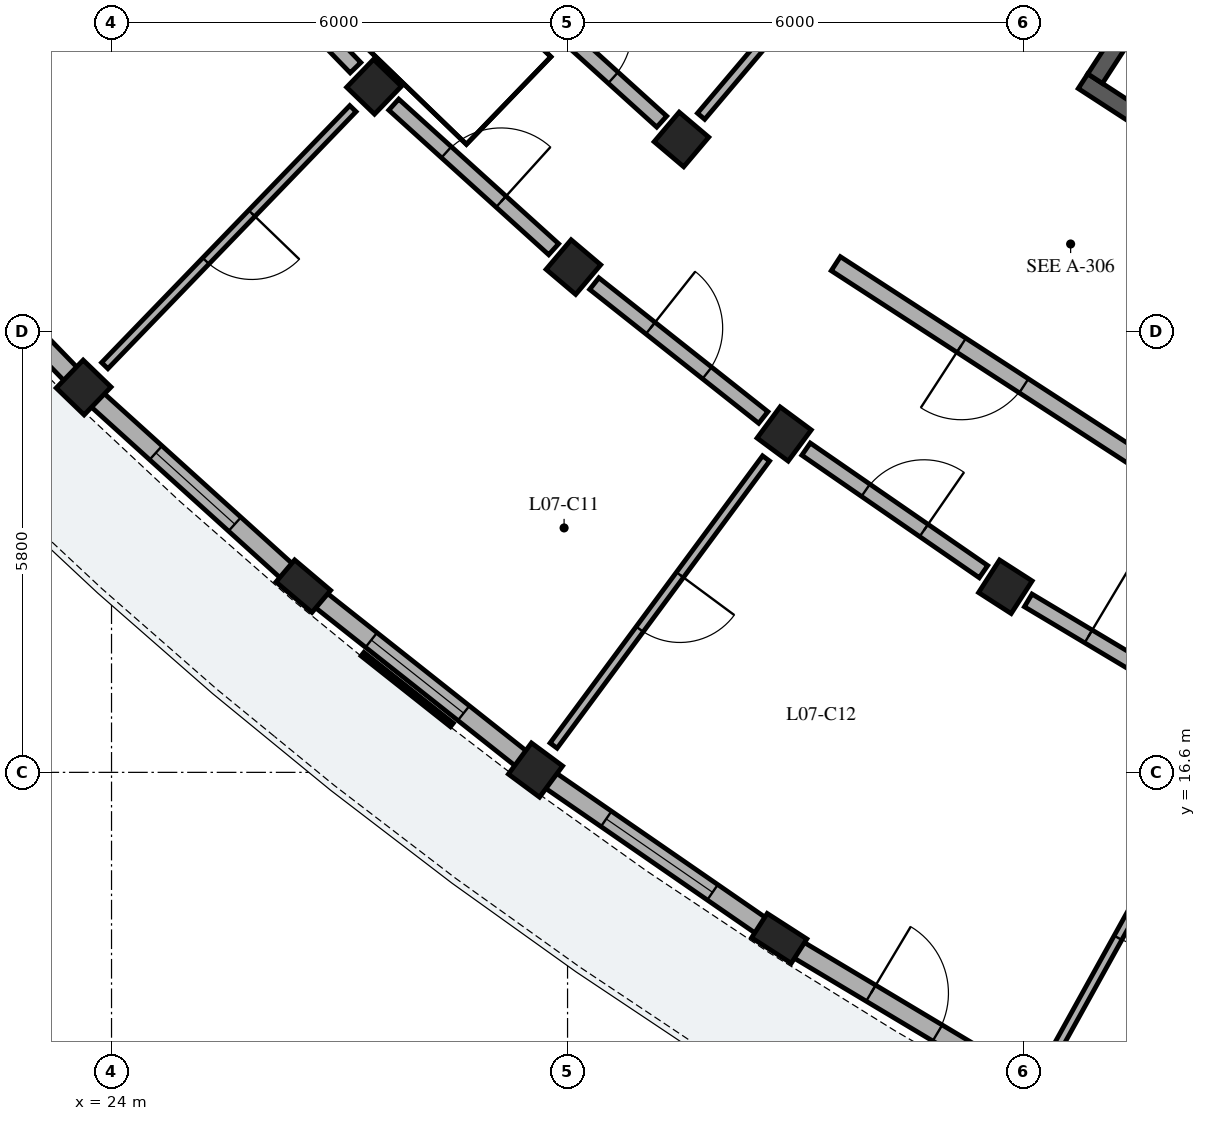
"""IFC4 building model, lengths in metres.
Left out: names, types, materials, properties, quantities, classifications, styles, units other than length and angle.
Written with IfcOpenShell. Run it as: python <this file> out.ifc"""

import sys

from ifc_helpers import new_model, si_unit, direction, frame, frame_2d, origin, origin_2d, place, context, subcontext, project, spatial, rectangle, extrude, element, fill, save


model = new_model("IFC4")
c1 = context("Model", 3, precision=1e-05, world=origin(), true_north=direction((0.0, 1.0)))
c2 = subcontext(c1, "Body", "Model", "MODEL_VIEW")
j1 = project(units=[si_unit("LENGTHUNIT", "METRE"), si_unit("PLANEANGLEUNIT", "RADIAN")], contexts=[c1])
p1 = place(None, origin())
s1 = spatial("IfcSite", under=j1, at=p1, CompositionType="ELEMENT")
p2 = place(p1, origin())
s2 = spatial("IfcBuilding", under=s1, at=p2, CompositionType="ELEMENT")
p3 = place(p2, frame((0.0, 0.0, 25.64)))
s3 = spatial("IfcBuildingStorey", under=s2, at=p3, CompositionType="ELEMENT", Elevation=25.64)
p4 = place(p3, frame((39.516, 23.917, 0.0), z_axis=(0.0, 0.0, 1.0), x_axis=(-0.838660840752, 0.544654013286, 0.0)))
e1 = element("IfcWall", 1, at=p4, inside=s3, PredefinedType="SHEAR", context=c2, shape_type="SweptSolid", body=[
    extrude(rectangle(XDim=3.26, YDim=0.23, at=frame_2d((1.63, 0.0))), origin(), (0.0, 0.0, 1.0), 3.11),
])
p5 = place(p4, frame((0.9, 0.0, 0.0)))
e2 = element("IfcOpeningElement", 2, at=p5, cuts=e1, PredefinedType="OPENING", context=c2, shape_type="SweptSolid", body=[
    extrude(rectangle(XDim=1.0, YDim=2.15, at=frame_2d((0.5, 1.075))), frame((0.0, 0.125, 0.0), z_axis=(0.0, -1.0, 0.0), x_axis=(1.0, 0.0, 0.0)), (0.0, 0.0, 1.0), 0.25),
])
p6 = place(p3, frame((36.941, 25.727, 0.0), z_axis=(0.0, 0.0, 1.0), x_axis=(0.544622789439, 0.838681117722, 0.0)))
e3 = element("IfcWall", 3, at=p6, inside=s3, PredefinedType="SHEAR", context=c2, shape_type="SweptSolid", body=[
    extrude(rectangle(XDim=2.7, YDim=0.23, at=frame_2d((1.35, 0.0))), origin(), (0.0, 0.0, 1.0), 3.11),
])
for number, where, z_axis, x_axis in (
    (4, (27.454, 25.62, 0.0), (0.0, 0.0, 1.0), (-0.695, -0.719, 0.0)),
    (5, (23.633, 21.663, 0.0), (0.0, 0.0, 1.0), (-0.695, -0.719, 0.0)),
    (6, (31.499, 24.927, 0.0), (0.0, 0.0, 1.0), (-0.646, -0.763, 0.0)),
    (7, (30.077, 23.247, 0.0), (0.0, 0.0, 1.0), (-0.646, -0.763, 0.0)),
):
    element("IfcColumn", number, at=place(p3, frame(where, z_axis=z_axis, x_axis=x_axis)), inside=s3, PredefinedType="COLUMN", context=c2, shape_type="SweptSolid", body=[
        extrude(rectangle(XDim=0.51, YDim=0.51, at=origin_2d()), origin(), (0.0, 0.0, 1.0), 3.11),
    ])
p7 = place(p3, frame((26.523, 19.05, 0.0), z_axis=(0.0, 0.0, 1.0), x_axis=(-0.646123979643, -0.763232469783, 0.0)))
e8 = element("IfcColumn", 8, at=p7, inside=s3, PredefinedType="PILASTER", context=c2, shape_type="SweptSolid", body=[
    extrude(rectangle(XDim=0.38, YDim=0.62, at=origin_2d()), origin(), (0.0, 0.0, 1.0), 3.11),
])
for number, where, z_axis, x_axis in (
    (9, (32.85, 21.052, 0.0), (0.0, 0.0, 1.0), (-0.595, -0.804, 0.0)),
    (10, (29.578, 16.63, 0.0), (0.0, 0.0, 1.0), (-0.595, -0.804, 0.0)),
    (11, (35.76, 19.042, 0.0), (0.0, 0.0, 1.0), (-0.541, -0.841, 0.0)),
):
    element("IfcColumn", number, at=place(p3, frame(where, z_axis=z_axis, x_axis=x_axis)), inside=s3, PredefinedType="COLUMN", context=c2, shape_type="SweptSolid", body=[
        extrude(rectangle(XDim=0.51, YDim=0.51, at=origin_2d()), origin(), (0.0, 0.0, 1.0), 3.11),
    ])
p8 = place(p3, frame((32.785, 14.416, 0.0), z_axis=(0.0, 0.0, 1.0), x_axis=(-0.540974471368, -0.841039012964, 0.0)))
e12 = element("IfcColumn", 12, at=p8, inside=s3, PredefinedType="PILASTER", context=c2, shape_type="SweptSolid", body=[
    extrude(rectangle(XDim=0.38, YDim=0.62, at=origin_2d()), origin(), (0.0, 0.0, 1.0), 3.11),
])
p9 = place(p3, frame((21.031, 24.346, 0.0), z_axis=(0.0, 0.0, 1.0), x_axis=(0.696213152496, -0.717835110797, 0.0)))
e13 = element("IfcWall", 13, at=p9, inside=s3, PredefinedType="SOLIDWALL", context=c2, shape_type="SweptSolid", body=[
    extrude(rectangle(XDim=3.512, YDim=0.245, at=frame_2d((1.756, 0.0))), origin(), (0.0, 0.0, 1.0), 2.355),
])
p10 = place(p9, frame((1.246, 0.0, 0.0)))
e14 = element("IfcOpeningElement", 14, at=p10, cuts=e13, PredefinedType="OPENING", context=c2, shape_type="SweptSolid", body=[
    extrude(rectangle(XDim=1.02, YDim=2.14, at=frame_2d((0.51, 1.07))), frame((0.0, 0.133, 0.0), z_axis=(0.0, -1.0, 0.0), x_axis=(1.0, 0.0, 0.0)), (0.0, 0.0, 1.0), 0.265),
])
p11 = place(p3, frame((23.8, 21.512, 0.0), z_axis=(0.0, 0.0, 1.0), x_axis=(0.74163953018, -0.670798633924, 0.0)))
e15 = element("IfcWall", 15, at=p11, inside=s3, PredefinedType="SOLIDWALL", context=c2, shape_type="SweptSolid", body=[
    extrude(rectangle(XDim=3.512, YDim=0.245, at=frame_2d((1.756, 0.0))), origin(), (0.0, 0.0, 1.0), 2.355),
])
p12 = place(p11, frame((1.056, 0.0, 0.35)))
e16 = element("IfcOpeningElement", 16, at=p12, cuts=e15, PredefinedType="OPENING", context=c2, shape_type="SweptSolid", body=[
    extrude(rectangle(XDim=1.4, YDim=1.65, at=frame_2d((0.7, 0.825))), frame((0.0, 0.133, 0.0), z_axis=(0.0, -1.0, 0.0), x_axis=(1.0, 0.0, 0.0)), (0.0, 0.0, 1.0), 0.265),
])
p13 = place(p3, frame((26.649, 18.95, 0.0), z_axis=(0.0, 0.0, 1.0), x_axis=(0.78396546672, -0.620804435383, 0.0)))
e17 = element("IfcWall", 17, at=p13, inside=s3, PredefinedType="SOLIDWALL", context=c2, shape_type="SweptSolid", body=[
    extrude(rectangle(XDim=3.512, YDim=0.245, at=frame_2d((1.756, 0.0))), origin(), (0.0, 0.0, 1.0), 2.355),
])
p14 = place(p13, frame((0.981, 0.0, 0.35)))
e18 = element("IfcOpeningElement", 18, at=p14, cuts=e17, PredefinedType="OPENING", context=c2, shape_type="SweptSolid", body=[
    extrude(rectangle(XDim=1.55, YDim=1.75, at=frame_2d((0.775, 0.875))), frame((0.0, 0.133, 0.0), z_axis=(0.0, -1.0, 0.0), x_axis=(1.0, 0.0, 0.0)), (0.0, 0.0, 1.0), 0.265),
])
p15 = place(p3, frame((29.763, 16.502, 0.0), z_axis=(0.0, 0.0, 1.0), x_axis=(0.822902318015, -0.568182871094, 0.0)))
e19 = element("IfcWall", 19, at=p15, inside=s3, PredefinedType="SOLIDWALL", context=c2, shape_type="SweptSolid", body=[
    extrude(rectangle(XDim=3.512, YDim=0.245, at=frame_2d((1.756, 0.0))), origin(), (0.0, 0.0, 1.0), 2.355),
])
p16 = place(p15, frame((0.906, 0.0, 0.35)))
e20 = element("IfcOpeningElement", 20, at=p16, cuts=e19, PredefinedType="OPENING", context=c2, shape_type="SweptSolid", body=[
    extrude(rectangle(XDim=1.7, YDim=1.8, at=frame_2d((0.85, 0.9))), frame((0.0, 0.133, 0.0), z_axis=(0.0, -1.0, 0.0), x_axis=(1.0, 0.0, 0.0)), (0.0, 0.0, 1.0), 0.265),
])
p17 = place(p3, frame((32.922, 14.334, 0.0), z_axis=(0.0, 0.0, 1.0), x_axis=(0.858277078874, -0.513186570245, 0.0)))
e21 = element("IfcWall", 21, at=p17, inside=s3, PredefinedType="SOLIDWALL", context=c2, shape_type="SweptSolid", body=[
    extrude(rectangle(XDim=3.512, YDim=0.245, at=frame_2d((1.756, 0.0))), origin(), (0.0, 0.0, 1.0), 2.355),
])
p18 = place(p17, frame((1.246, 0.0, 0.0)))
e22 = element("IfcOpeningElement", 22, at=p18, cuts=e21, PredefinedType="OPENING", context=c2, shape_type="SweptSolid", body=[
    extrude(rectangle(XDim=1.02, YDim=2.14, at=frame_2d((0.51, 1.07))), frame((0.0, 0.133, 0.0), z_axis=(0.0, -1.0, 0.0), x_axis=(1.0, 0.0, 0.0)), (0.0, 0.0, 1.0), 0.265),
])
p19 = place(p3, frame((37.639, 20.623, 0.0), z_axis=(0.0, 0.0, 1.0), x_axis=(-0.838681446513, 0.544622283124, 0.0)))
e23 = element("IfcWall", 23, at=p19, inside=s3, PredefinedType="PARTITIONING", context=c2, shape_type="SweptSolid", body=[
    extrude(rectangle(XDim=4.9, YDim=0.22, at=frame_2d((2.45, 0.0))), origin(), (0.0, 0.0, 1.0), 2.34),
])
p20 = place(p19, frame((1.95, 0.0, 0.0)))
e24 = element("IfcOpeningElement", 24, at=p20, cuts=e23, PredefinedType="OPENING", context=c2, shape_type="SweptSolid", body=[
    extrude(rectangle(XDim=0.98, YDim=2.14, at=frame_2d((0.49, 1.07))), frame((0.0, 0.12, 0.0), z_axis=(0.0, -1.0, 0.0), x_axis=(1.0, 0.0, 0.0)), (0.0, 0.0, 1.0), 0.24),
])
p21 = place(p3, frame((25.235, 27.907, 0.0), z_axis=(0.0, 0.0, 1.0), x_axis=(0.696223786753, -0.717824796701, 0.0)))
e25 = element("IfcWall", 25, at=p21, inside=s3, PredefinedType="PARTITIONING", context=c2, shape_type="SweptSolid", body=[
    extrude(rectangle(XDim=2.837, YDim=0.195, at=frame_2d((1.418, 0.0))), origin(), (0.0, 0.0, 1.0), 2.37),
])
p22 = place(p21, frame((0.924, 0.0, 0.0)))
e26 = element("IfcOpeningElement", 26, at=p22, cuts=e25, PredefinedType="OPENING", context=c2, shape_type="SweptSolid", body=[
    extrude(rectangle(XDim=0.99, YDim=2.16, at=frame_2d((0.495, 1.08))), frame((0.0, 0.107, 0.0), z_axis=(0.0, -1.0, 0.0), x_axis=(1.0, 0.0, 0.0)), (0.0, 0.0, 1.0), 0.215),
])
p23 = place(p3, frame((27.176, 25.332, 0.0), z_axis=(0.0, 0.0, 1.0), x_axis=(-0.69466218314, -0.719336118456, 0.0)))
e27 = element("IfcWall", 27, at=p23, inside=s3, PredefinedType="PARTITIONING", context=c2, shape_type="SweptSolid", body=[
    extrude(rectangle(XDim=4.7, YDim=0.115, at=frame_2d((2.35, 0.0))), origin(), (0.0, 0.0, 1.0), 2.37),
])
p24 = place(p23, frame((1.915, 0.0, 0.0)))
e28 = element("IfcOpeningElement", 28, at=p24, cuts=e27, PredefinedType="OPENING", context=c2, shape_type="SweptSolid", body=[
    extrude(rectangle(XDim=0.87, YDim=2.08, at=frame_2d((0.435, 1.04))), frame((0.0, 0.067, 0.0), z_axis=(0.0, -1.0, 0.0), x_axis=(1.0, 0.0, 0.0)), (0.0, 0.0, 1.0), 0.135),
])
p25 = place(p3, frame((27.713, 25.385, 0.0), z_axis=(0.0, 0.0, 1.0), x_axis=(0.741631592147, -0.670807410163, 0.0)))
e29 = element("IfcWall", 29, at=p25, inside=s3, PredefinedType="PARTITIONING", context=c2, shape_type="SweptSolid", body=[
    extrude(rectangle(XDim=2.837, YDim=0.195, at=frame_2d((1.418, 0.0))), origin(), (0.0, 0.0, 1.0), 2.37),
])
p26 = place(p25, frame((0.934, 0.0, 0.0)))
e30 = element("IfcOpeningElement", 30, at=p26, cuts=e29, PredefinedType="OPENING", context=c2, shape_type="SweptSolid", body=[
    extrude(rectangle(XDim=0.97, YDim=2.15, at=frame_2d((0.485, 1.075))), frame((0.0, 0.107, 0.0), z_axis=(0.0, -1.0, 0.0), x_axis=(1.0, 0.0, 0.0)), (0.0, 0.0, 1.0), 0.215),
])
p27 = place(p3, frame((29.241, 26.968, 0.0), z_axis=(0.0, 0.0, 1.0), x_axis=(0.74166462946, -0.670770882945, 0.0)))
e31 = element("IfcWall", 31, at=p27, inside=s3, PredefinedType="PARTITIONING", context=c2, shape_type="SweptSolid", body=[
    extrude(rectangle(XDim=2.693, YDim=0.195, at=frame_2d((1.347, 0.0))), origin(), (0.0, 0.0, 1.0), 2.37),
])
p28 = place(p27, frame((0.862, 0.0, 0.0)))
e32 = element("IfcOpeningElement", 32, at=p28, cuts=e31, PredefinedType="OPENING", context=c2, shape_type="SweptSolid", body=[
    extrude(rectangle(XDim=0.97, YDim=2.15, at=frame_2d((0.485, 1.075))), frame((0.0, 0.107, 0.0), z_axis=(0.0, -1.0, 0.0), x_axis=(1.0, 0.0, 0.0)), (0.0, 0.0, 1.0), 0.215),
])
p29 = place(p3, frame((36.021, 30.269, 0.0), z_axis=(0.0, 0.0, 1.0), x_axis=(-0.646121311019, -0.763234728932, 0.0)))
e33 = element("IfcWall", 33, at=p29, inside=s3, PredefinedType="PARTITIONING", context=c2, shape_type="SweptSolid", body=[
    extrude(rectangle(XDim=6.6, YDim=0.125, at=frame_2d((3.3, 0.0))), origin(), (0.0, 0.0, 1.0), 2.37),
])
p30 = place(p29, frame((2.855, 0.0, 0.0)))
e34 = element("IfcOpeningElement", 34, at=p30, cuts=e33, PredefinedType="OPENING", context=c2, shape_type="SweptSolid", body=[
    extrude(rectangle(XDim=0.89, YDim=2.1, at=frame_2d((0.445, 1.05))), frame((0.0, 0.073, 0.0), z_axis=(0.0, -1.0, 0.0), x_axis=(1.0, 0.0, 0.0)), (0.0, 0.0, 1.0), 0.145),
])
p31 = place(p3, frame((30.351, 23.03, 0.0), z_axis=(0.0, 0.0, 1.0), x_axis=(0.783965548427, -0.620804332201, 0.0)))
e35 = element("IfcWall", 35, at=p31, inside=s3, PredefinedType="PARTITIONING", context=c2, shape_type="SweptSolid", body=[
    extrude(rectangle(XDim=2.837, YDim=0.195, at=frame_2d((1.418, 0.0))), origin(), (0.0, 0.0, 1.0), 2.37),
])
p32 = place(p31, frame((0.944, 0.0, 0.0)))
e36 = element("IfcOpeningElement", 36, at=p32, cuts=e35, PredefinedType="OPENING", context=c2, shape_type="SweptSolid", body=[
    extrude(rectangle(XDim=0.95, YDim=2.13, at=frame_2d((0.475, 1.065))), frame((0.0, 0.107, 0.0), z_axis=(0.0, -1.0, 0.0), x_axis=(1.0, 0.0, 0.0)), (0.0, 0.0, 1.0), 0.215),
])
p33 = place(p3, frame((32.612, 20.73, 0.0), z_axis=(0.0, 0.0, 1.0), x_axis=(-0.59482622273, -0.803854318116, 0.0)))
e37 = element("IfcWall", 37, at=p33, inside=s3, PredefinedType="PARTITIONING", context=c2, shape_type="SweptSolid", body=[
    extrude(rectangle(XDim=4.7, YDim=0.115, at=frame_2d((2.35, 0.0))), origin(), (0.0, 0.0, 1.0), 2.37),
])
p34 = place(p33, frame((1.905, 0.0, 0.0)))
e38 = element("IfcOpeningElement", 38, at=p34, cuts=e37, PredefinedType="OPENING", context=c2, shape_type="SweptSolid", body=[
    extrude(rectangle(XDim=0.89, YDim=2.1, at=frame_2d((0.445, 1.05))), frame((0.0, 0.067, 0.0), z_axis=(0.0, -1.0, 0.0), x_axis=(1.0, 0.0, 0.0)), (0.0, 0.0, 1.0), 0.135),
])
p35 = place(p3, frame((33.138, 20.853, 0.0), z_axis=(0.0, 0.0, 1.0), x_axis=(0.822870075235, -0.568229565653, 0.0)))
e39 = element("IfcWall", 39, at=p35, inside=s3, PredefinedType="PARTITIONING", context=c2, shape_type="SweptSolid", body=[
    extrude(rectangle(XDim=2.837, YDim=0.195, at=frame_2d((1.418, 0.0))), origin(), (0.0, 0.0, 1.0), 2.37),
])
p36 = place(p35, frame((0.954, 0.0, 0.0)))
e40 = element("IfcOpeningElement", 40, at=p36, cuts=e39, PredefinedType="OPENING", context=c2, shape_type="SweptSolid", body=[
    extrude(rectangle(XDim=0.93, YDim=2.12, at=frame_2d((0.465, 1.06))), frame((0.0, 0.107, 0.0), z_axis=(0.0, -1.0, 0.0), x_axis=(1.0, 0.0, 0.0)), (0.0, 0.0, 1.0), 0.215),
])
p37 = place(p3, frame((36.061, 18.862, 0.0), z_axis=(0.0, 0.0, 1.0), x_axis=(0.858281647443, -0.51317892948, 0.0)))
e41 = element("IfcWall", 41, at=p37, inside=s3, PredefinedType="PARTITIONING", context=c2, shape_type="SweptSolid", body=[
    extrude(rectangle(XDim=2.837, YDim=0.195, at=frame_2d((1.418, 0.0))), origin(), (0.0, 0.0, 1.0), 2.37),
])
p38 = place(p37, frame((0.924, 0.0, 0.0)))
e42 = element("IfcOpeningElement", 42, at=p38, cuts=e41, PredefinedType="OPENING", context=c2, shape_type="SweptSolid", body=[
    extrude(rectangle(XDim=0.99, YDim=2.16, at=frame_2d((0.495, 1.08))), frame((0.0, 0.107, 0.0), z_axis=(0.0, -1.0, 0.0), x_axis=(1.0, 0.0, 0.0)), (0.0, 0.0, 1.0), 0.215),
])
p39 = place(p3, frame((38.602, 16.877, 0.0), z_axis=(0.0, 0.0, 1.0), x_axis=(-0.484813534336, -0.874617537513, 0.0)))
e43 = element("IfcWall", 43, at=p39, inside=s3, PredefinedType="PARTITIONING", context=c2, shape_type="SweptSolid", body=[
    extrude(rectangle(XDim=4.7, YDim=0.115, at=frame_2d((2.35, 0.0))), origin(), (0.0, 0.0, 1.0), 2.37),
])
p40 = place(p39, frame((1.895, 0.0, 0.0)))
e44 = element("IfcOpeningElement", 44, at=p40, cuts=e43, PredefinedType="OPENING", context=c2, shape_type="SweptSolid", body=[
    extrude(rectangle(XDim=0.91, YDim=2.1, at=frame_2d((0.455, 1.05))), frame((0.0, 0.067, 0.0), z_axis=(0.0, -1.0, 0.0), x_axis=(1.0, 0.0, 0.0)), (0.0, 0.0, 1.0), 0.135),
])
p41 = place(p12, origin())
e45 = element("IfcWindow", 45, at=p41, inside=s3, PartitioningType="SINGLE_PANEL", PredefinedType="WINDOW", context=c2, shape_type="SweptSolid", body=[
    extrude(rectangle(XDim=1.4, YDim=1.65, at=frame_2d((0.7, 0.825))), frame((0.0, 0.03, 0.0), z_axis=(0.0, -1.0, 0.0), x_axis=(1.0, 0.0, 0.0)), (0.0, 0.0, 1.0), 0.06),
])
fill(e16, e45)
p42 = place(p14, origin())
e46 = element("IfcWindow", 46, at=p42, inside=s3, PartitioningType="SINGLE_PANEL", PredefinedType="WINDOW", context=c2, shape_type="SweptSolid", body=[
    extrude(rectangle(XDim=1.55, YDim=1.75, at=frame_2d((0.775, 0.875))), frame((0.0, 0.03, 0.0), z_axis=(0.0, -1.0, 0.0), x_axis=(1.0, 0.0, 0.0)), (0.0, 0.0, 1.0), 0.06),
])
fill(e18, e46)
p43 = place(p16, origin())
e47 = element("IfcWindow", 47, at=p43, inside=s3, PartitioningType="SINGLE_PANEL", PredefinedType="WINDOW", context=c2, shape_type="SweptSolid", body=[
    extrude(rectangle(XDim=1.7, YDim=1.8, at=frame_2d((0.85, 0.9))), frame((0.0, 0.03, 0.0), z_axis=(0.0, -1.0, 0.0), x_axis=(1.0, 0.0, 0.0)), (0.0, 0.0, 1.0), 0.06),
])
fill(e20, e47)
p44 = place(p18, origin())
e48 = element("IfcDoor", 48, at=p44, inside=s3, OperationType="SINGLE_SWING_LEFT", PredefinedType="DOOR", context=c2, shape_type="SweptSolid", body=[
    extrude(rectangle(XDim=1.02, YDim=2.14, at=frame_2d((0.51, 1.07))), frame((0.0, 0.025, 0.0), z_axis=(0.0, -1.0, 0.0), x_axis=(1.0, 0.0, 0.0)), (0.0, 0.0, 1.0), 0.05),
])
fill(e22, e48)
p45 = place(p20, origin())
e49 = element("IfcDoor", 49, at=p45, inside=s3, OperationType="SINGLE_SWING_RIGHT", PredefinedType="DOOR", context=c2, shape_type="SweptSolid", body=[
    extrude(rectangle(XDim=0.98, YDim=2.14, at=frame_2d((0.49, 1.07))), frame((0.0, 0.025, 0.0), z_axis=(0.0, -1.0, 0.0), x_axis=(1.0, 0.0, 0.0)), (0.0, 0.0, 1.0), 0.05),
])
fill(e24, e49)
p46 = place(p24, origin())
e50 = element("IfcDoor", 50, at=p46, inside=s3, OperationType="SINGLE_SWING_LEFT", PredefinedType="DOOR", context=c2, shape_type="SweptSolid", body=[
    extrude(rectangle(XDim=0.87, YDim=2.08, at=frame_2d((0.435, 1.04))), frame((0.0, 0.025, 0.0), z_axis=(0.0, -1.0, 0.0), x_axis=(1.0, 0.0, 0.0)), (0.0, 0.0, 1.0), 0.05),
])
fill(e28, e50)
p47 = place(p26, origin())
e51 = element("IfcDoor", 51, at=p47, inside=s3, OperationType="SINGLE_SWING_RIGHT", PredefinedType="DOOR", context=c2, shape_type="SweptSolid", body=[
    extrude(rectangle(XDim=0.97, YDim=2.15, at=frame_2d((0.485, 1.075))), frame((0.0, 0.025, 0.0), z_axis=(0.0, -1.0, 0.0), x_axis=(1.0, 0.0, 0.0)), (0.0, 0.0, 1.0), 0.05),
])
fill(e30, e51)
p48 = place(p28, origin())
e52 = element("IfcDoor", 52, at=p48, inside=s3, OperationType="SINGLE_SWING_LEFT", PredefinedType="DOOR", context=c2, shape_type="SweptSolid", body=[
    extrude(rectangle(XDim=0.97, YDim=2.15, at=frame_2d((0.485, 1.075))), frame((0.0, 0.025, 0.0), z_axis=(0.0, -1.0, 0.0), x_axis=(1.0, 0.0, 0.0)), (0.0, 0.0, 1.0), 0.05),
])
fill(e32, e52)
p49 = place(p32, origin())
e53 = element("IfcDoor", 53, at=p49, inside=s3, OperationType="SINGLE_SWING_LEFT", PredefinedType="DOOR", context=c2, shape_type="SweptSolid", body=[
    extrude(rectangle(XDim=0.95, YDim=2.13, at=frame_2d((0.475, 1.065))), frame((0.0, 0.025, 0.0), z_axis=(0.0, -1.0, 0.0), x_axis=(1.0, 0.0, 0.0)), (0.0, 0.0, 1.0), 0.05),
])
fill(e36, e53)
p50 = place(p34, origin())
e54 = element("IfcDoor", 54, at=p50, inside=s3, OperationType="SINGLE_SWING_LEFT", PredefinedType="DOOR", context=c2, shape_type="SweptSolid", body=[
    extrude(rectangle(XDim=0.89, YDim=2.1, at=frame_2d((0.445, 1.05))), frame((0.0, 0.025, 0.0), z_axis=(0.0, -1.0, 0.0), x_axis=(1.0, 0.0, 0.0)), (0.0, 0.0, 1.0), 0.05),
])
fill(e38, e54)
p51 = place(p36, origin())
e55 = element("IfcDoor", 55, at=p51, inside=s3, OperationType="SINGLE_SWING_RIGHT", PredefinedType="DOOR", context=c2, shape_type="SweptSolid", body=[
    extrude(rectangle(XDim=0.93, YDim=2.12, at=frame_2d((0.465, 1.06))), frame((0.0, 0.025, 0.0), z_axis=(0.0, -1.0, 0.0), x_axis=(1.0, 0.0, 0.0)), (0.0, 0.0, 1.0), 0.05),
])
fill(e40, e55)
p52 = place(p38, origin())
e56 = element("IfcDoor", 56, at=p52, inside=s3, OperationType="SINGLE_SWING_LEFT", PredefinedType="DOOR", context=c2, shape_type="SweptSolid", body=[
    extrude(rectangle(XDim=0.99, YDim=2.16, at=frame_2d((0.495, 1.08))), frame((0.0, 0.025, 0.0), z_axis=(0.0, -1.0, 0.0), x_axis=(1.0, 0.0, 0.0)), (0.0, 0.0, 1.0), 0.05),
])
fill(e42, e56)
p53 = place(p40, origin())
e57 = element("IfcDoor", 57, at=p53, inside=s3, OperationType="SINGLE_SWING_LEFT", PredefinedType="DOOR", context=c2, shape_type="SweptSolid", body=[
    extrude(rectangle(XDim=0.91, YDim=2.1, at=frame_2d((0.455, 1.05))), frame((0.0, 0.025, 0.0), z_axis=(0.0, -1.0, 0.0), x_axis=(1.0, 0.0, 0.0)), (0.0, 0.0, 1.0), 0.05),
])
fill(e44, e57)
save(model, sys.argv[1])
